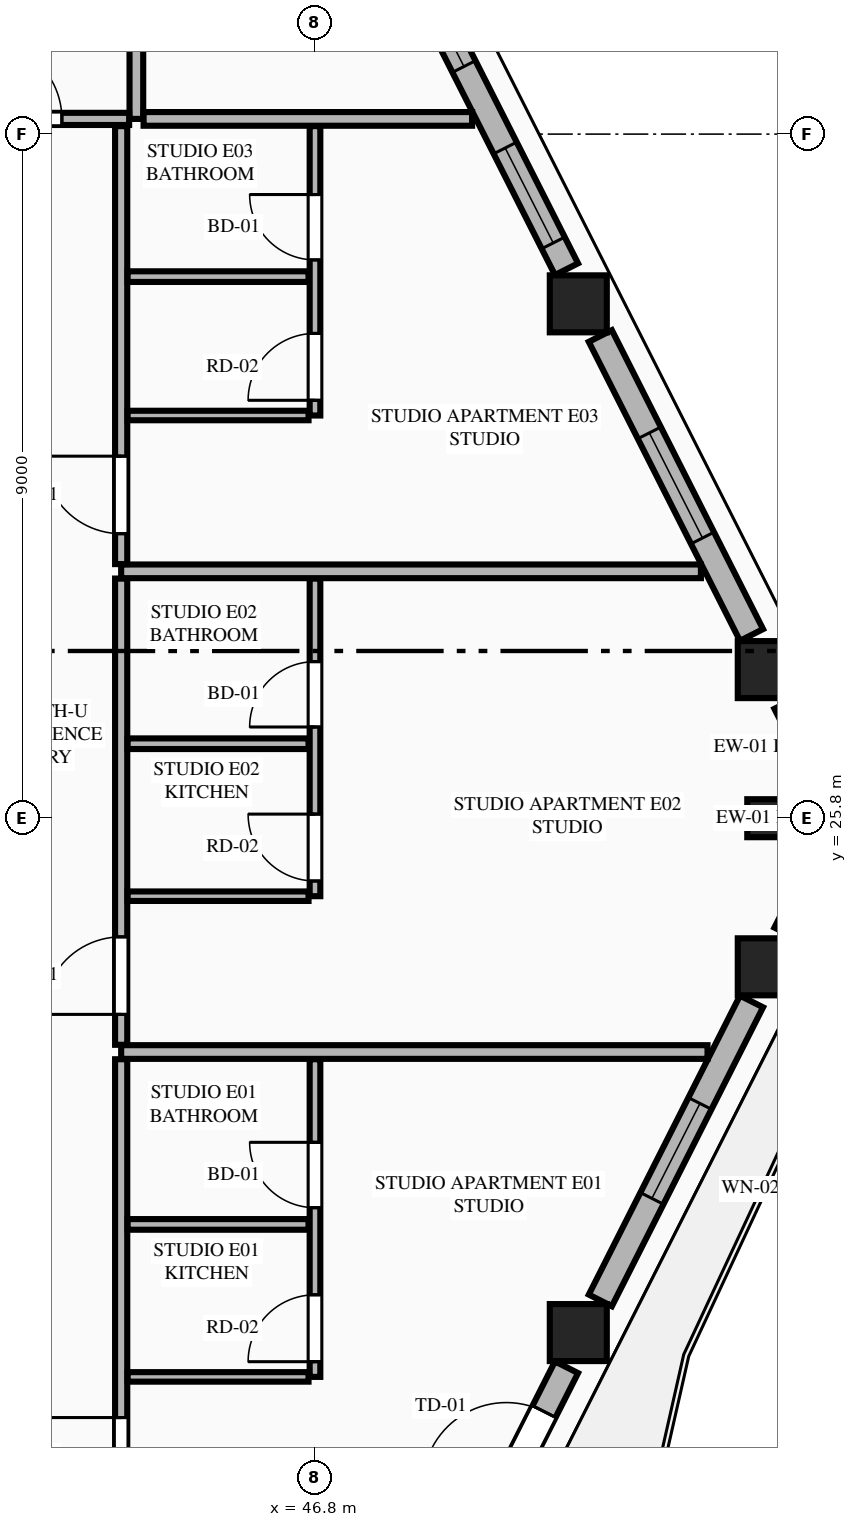
"""IFC4 building model, lengths in metres.
Left out: names, types, materials, properties, quantities, classifications, styles, units other than length and angle.
Written with IfcOpenShell. Run it as: python <this file> out.ifc"""

import sys

from ifc_helpers import new_model, si_unit, direction, frame, frame_2d, origin, origin_2d, place, context, subcontext, project, spatial, rectangle, extrude, element, fill, save


model = new_model("IFC4")
c1 = context("Model", 3, precision=1e-05, world=origin(), true_north=direction((0.0, 1.0)))
c2 = subcontext(c1, "Body", "Model", "MODEL_VIEW")
j1 = project(units=[si_unit("LENGTHUNIT", "METRE"), si_unit("PLANEANGLEUNIT", "RADIAN")], contexts=[c1])
p1 = place(None, origin())
s1 = spatial("IfcSite", under=j1, at=p1, CompositionType="ELEMENT")
p2 = place(p1, origin())
s2 = spatial("IfcBuilding", under=s1, at=p2, CompositionType="ELEMENT")
p3 = place(p2, frame((0.0, 0.0, 248.9)))
s3 = spatial("IfcBuildingStorey", under=s2, at=p3, CompositionType="ELEMENT", Elevation=248.9)
for number, where, z_axis, x_axis in (
    (1, (50.264, 19.033, 0.0), (0.0, 0.0, 1.0), (1.0, 0.0, 0.0)),
    (2, (52.737, 23.845, 0.0), (0.0, 0.0, 1.0), (1.0, 0.0, 0.0)),
    (3, (52.737, 27.755, 0.0), (0.0, 0.0, 1.0), (1.0, 0.0, 0.0)),
    (4, (50.264, 32.567, 0.0), (0.0, 0.0, 1.0), (1.0, 0.0, 0.0)),
):
    element("IfcColumn", number, at=place(p3, frame(where, z_axis=z_axis, x_axis=x_axis)), inside=s3, PredefinedType="COLUMN", context=c2, shape_type="SweptSolid", body=[
        extrude(rectangle(XDim=0.75, YDim=0.75, at=origin_2d()), origin(), (0.0, 0.0, 1.0), 3.65),
    ])
p4 = place(p3, frame((52.737, 25.8, 0.0), z_axis=(0.0, 0.0, 1.0), x_axis=(0.0, 1.0, 0.0)))
e5 = element("IfcColumn", 5, at=p4, inside=s3, PredefinedType="PILASTER", context=c2, shape_type="SweptSolid", body=[
    extrude(rectangle(XDim=0.5, YDim=0.35, at=origin_2d()), origin(), (0.0, 0.0, 1.0), 3.65),
])
p5 = place(p3, frame((48.032, 14.473, 0.0), z_axis=(0.0, 0.0, 1.0), x_axis=(0.451539564999, 0.892251097641, 0.0)))
e6 = element("IfcWall", 6, at=p5, inside=s3, PredefinedType="STANDARD", context=c2, shape_type="SweptSolid", body=[
    extrude(rectangle(XDim=4.6, YDim=0.34, at=frame_2d((2.3, 0.0))), origin(), (0.0, 0.0, 1.0), 2.983),
])
p6 = place(p5, frame((2.846, 0.0, 0.0)))
e7 = element("IfcOpeningElement", 7, at=p6, cuts=e6, PredefinedType="OPENING", context=c2, shape_type="SweptSolid", body=[
    extrude(rectangle(XDim=1.1, YDim=2.25, at=frame_2d((0.55, 1.125))), frame((0.0, 0.18, 0.0), z_axis=(0.0, -1.0, 0.0), x_axis=(1.0, 0.0, 0.0)), (0.0, 0.0, 1.0), 0.36),
])
p7 = place(p5, frame((0.4, 0.0, 0.75)))
e8 = element("IfcOpeningElement", 8, at=p7, cuts=e6, PredefinedType="OPENING", context=c2, shape_type="SweptSolid", body=[
    extrude(rectangle(XDim=1.1, YDim=2.0, at=frame_2d((0.55, 1.0))), frame((0.0, 0.18, 0.0), z_axis=(0.0, -1.0, 0.0), x_axis=(1.0, 0.0, 0.0)), (0.0, 0.0, 1.0), 0.36),
])
p8 = place(p3, frame((50.554, 19.456, 0.0), z_axis=(0.0, 0.0, 1.0), x_axis=(0.45130817501, 0.892368158984, 0.0)))
e9 = element("IfcWall", 9, at=p8, inside=s3, PredefinedType="STANDARD", context=c2, shape_type="SweptSolid", body=[
    extrude(rectangle(XDim=4.407, YDim=0.34, at=frame_2d((2.204, 0.0))), origin(), (0.0, 0.0, 1.0), 2.983),
])
p9 = place(p8, frame((1.504, 0.0, 0.75)))
e10 = element("IfcOpeningElement", 10, at=p9, cuts=e9, PredefinedType="OPENING", context=c2, shape_type="SweptSolid", body=[
    extrude(rectangle(XDim=1.4, YDim=2.05, at=frame_2d((0.7, 1.025))), frame((0.0, 0.18, 0.0), z_axis=(0.0, -1.0, 0.0), x_axis=(1.0, 0.0, 0.0)), (0.0, 0.0, 1.0), 0.36),
])
for number, where, z_axis, x_axis in (
    (11, (52.996, 24.284, 0.0), (0.0, 0.0, 1.0), (0.451, 0.893, 0.0)),
    (12, (53.344, 26.627, 0.0), (0.0, 0.0, 1.0), (-0.451, 0.893, 0.0)),
):
    element("IfcWall", number, at=place(p3, frame(where, z_axis=z_axis, x_axis=x_axis)), inside=s3, PredefinedType="STANDARD", context=c2, shape_type="SweptSolid", body=[
        extrude(rectangle(XDim=0.772, YDim=0.34, at=frame_2d((0.386, 0.0))), origin(), (0.0, 0.0, 1.0), 3.45),
    ])
p10 = place(p3, frame((52.543, 28.211, 0.0), z_axis=(0.0, 0.0, 1.0), x_axis=(-0.451285866323, 0.892379441077, 0.0)))
e13 = element("IfcWall", 13, at=p10, inside=s3, PredefinedType="STANDARD", context=c2, shape_type="SweptSolid", body=[
    extrude(rectangle(XDim=4.407, YDim=0.34, at=frame_2d((2.204, 0.0))), origin(), (0.0, 0.0, 1.0), 2.983),
])
p11 = place(p10, frame((1.429, 0.0, 0.75)))
e14 = element("IfcOpeningElement", 14, at=p11, cuts=e13, PredefinedType="OPENING", context=c2, shape_type="SweptSolid", body=[
    extrude(rectangle(XDim=1.55, YDim=2.05, at=frame_2d((0.775, 1.025))), frame((0.0, 0.18, 0.0), z_axis=(0.0, -1.0, 0.0), x_axis=(1.0, 0.0, 0.0)), (0.0, 0.0, 1.0), 0.36),
])
p12 = place(p3, frame((50.109, 33.023, 0.0), z_axis=(0.0, 0.0, 1.0), x_axis=(-0.451539564999, 0.892251097641, 0.0)))
e15 = element("IfcWall", 15, at=p12, inside=s3, PredefinedType="STANDARD", context=c2, shape_type="SweptSolid", body=[
    extrude(rectangle(XDim=4.6, YDim=0.34, at=frame_2d((2.3, 0.0))), origin(), (0.0, 0.0, 1.0), 2.983),
])
p13 = place(p12, frame((0.387, 0.0, 0.75)))
e16 = element("IfcOpeningElement", 16, at=p13, cuts=e15, PredefinedType="OPENING", context=c2, shape_type="SweptSolid", body=[
    extrude(rectangle(XDim=1.4, YDim=2.05, at=frame_2d((0.7, 1.025))), frame((0.0, 0.18, 0.0), z_axis=(0.0, -1.0, 0.0), x_axis=(1.0, 0.0, 0.0)), (0.0, 0.0, 1.0), 0.36),
])
p14 = place(p12, frame((2.988, 0.0, 0.75)))
e17 = element("IfcOpeningElement", 17, at=p14, cuts=e15, PredefinedType="OPENING", context=c2, shape_type="SweptSolid", body=[
    extrude(rectangle(XDim=1.1, YDim=2.0, at=frame_2d((0.55, 1.0))), frame((0.0, 0.18, 0.0), z_axis=(0.0, -1.0, 0.0), x_axis=(1.0, 0.0, 0.0)), (0.0, 0.0, 1.0), 0.36),
])
p15 = place(p3, frame((44.45, 35.0, 0.0), z_axis=(0.0, 0.0, 1.0), x_axis=(0.0, 1.0, 0.0)))
e18 = element("IfcWall", 18, at=p15, inside=s3, PredefinedType="PARTITIONING", context=c2, shape_type="SweptSolid", body=[
    extrude(rectangle(XDim=8.481, YDim=0.18, at=frame_2d((4.24, 0.0))), origin(), (0.0, 0.0, 1.0), 3.45),
])
p16 = place(p3, frame((29.241, 35.0, 0.0), z_axis=(0.0, 0.0, 1.0), x_axis=(1.0, 0.0, 0.0)))
e19 = element("IfcWall", 19, at=p16, inside=s3, PredefinedType="PARTITIONING", context=c2, shape_type="SweptSolid", body=[
    extrude(rectangle(XDim=15.114, YDim=0.16, at=frame_2d((7.557, 0.0))), origin(), (0.0, 0.0, 1.0), 3.45),
])
p17 = place(p16, frame((13.209, 0.0, 0.0)))
e20 = element("IfcOpeningElement", 20, at=p17, cuts=e19, PredefinedType="OPENING", context=c2, shape_type="SweptSolid", body=[
    extrude(rectangle(XDim=1.02, YDim=2.25, at=frame_2d((0.51, 1.125))), frame((0.0, 0.09, 0.0), z_axis=(0.0, -1.0, 0.0), x_axis=(1.0, 0.0, 0.0)), (0.0, 0.0, 1.0), 0.18),
])
p18 = place(p3, frame((44.545, 35.0, 0.0), z_axis=(0.0, 0.0, 1.0), x_axis=(1.0, 0.0, 0.0)))
e21 = element("IfcWall", 21, at=p18, inside=s3, PredefinedType="PARTITIONING", context=c2, shape_type="SweptSolid", body=[
    extrude(rectangle(XDim=4.322, YDim=0.18, at=frame_2d((2.161, 0.0))), origin(), (0.0, 0.0, 1.0), 3.45),
])
p19 = place(p3, frame((44.25, 16.495, 0.0), z_axis=(0.0, 0.0, 1.0), x_axis=(0.0, 1.0, 0.0)))
e22 = element("IfcWall", 22, at=p19, inside=s3, PredefinedType="PARTITIONING", context=c2, shape_type="SweptSolid", body=[
    extrude(rectangle(XDim=6.134, YDim=0.16, at=frame_2d((3.067, 0.0))), origin(), (0.0, 0.0, 1.0), 3.137),
])
p20 = place(p19, frame((0.4, 0.0, 0.0)))
e23 = element("IfcOpeningElement", 23, at=p20, cuts=e22, PredefinedType="OPENING", context=c2, shape_type="SweptSolid", body=[
    extrude(rectangle(XDim=1.02, YDim=2.25, at=frame_2d((0.51, 1.125))), frame((0.0, 0.09, 0.0), z_axis=(0.0, -1.0, 0.0), x_axis=(1.0, 0.0, 0.0)), (0.0, 0.0, 1.0), 0.18),
])
p21 = place(p3, frame((44.335, 18.45, 0.0), z_axis=(0.0, 0.0, 1.0), x_axis=(1.0, 0.0, 0.0)))
e24 = element("IfcWall", 24, at=p21, inside=s3, PredefinedType="PARTITIONING", context=c2, shape_type="SweptSolid", body=[
    extrude(rectangle(XDim=2.38, YDim=0.125, at=frame_2d((1.19, 0.0))), origin(), (0.0, 0.0, 1.0), 3.45),
])
p22 = place(p3, frame((46.8, 18.45, 0.0), z_axis=(0.0, 0.0, 1.0), x_axis=(0.0, 1.0, 0.0)))
e25 = element("IfcWall", 25, at=p22, inside=s3, PredefinedType="PLUMBINGWALL", context=c2, shape_type="SweptSolid", body=[
    extrude(rectangle(XDim=4.179, YDim=0.14, at=frame_2d((2.089, 0.0))), origin(), (0.0, 0.0, 1.0), 3.45),
])
p23 = place(p22, frame((2.226, 0.0, 0.0)))
e26 = element("IfcOpeningElement", 26, at=p23, cuts=e25, PredefinedType="OPENING", context=c2, shape_type="SweptSolid", body=[
    extrude(rectangle(XDim=0.86, YDim=2.1, at=frame_2d((0.43, 1.05))), frame((0.0, 0.08, 0.0), z_axis=(0.0, -1.0, 0.0), x_axis=(1.0, 0.0, 0.0)), (0.0, 0.0, 1.0), 0.16),
])
p24 = place(p22, frame((0.2, 0.0, 0.0)))
e27 = element("IfcOpeningElement", 27, at=p24, cuts=e25, PredefinedType="OPENING", context=c2, shape_type="SweptSolid", body=[
    extrude(rectangle(XDim=0.88, YDim=2.15, at=frame_2d((0.44, 1.075))), frame((0.0, 0.08, 0.0), z_axis=(0.0, -1.0, 0.0), x_axis=(1.0, 0.0, 0.0)), (0.0, 0.0, 1.0), 0.16),
])
p25 = place(p3, frame((44.335, 20.456, 0.0), z_axis=(0.0, 0.0, 1.0), x_axis=(1.0, 0.0, 0.0)))
e28 = element("IfcWall", 28, at=p25, inside=s3, PredefinedType="PLUMBINGWALL", context=c2, shape_type="SweptSolid", body=[
    extrude(rectangle(XDim=2.38, YDim=0.14, at=frame_2d((1.19, 0.0))), origin(), (0.0, 0.0, 1.0), 3.45),
])
p26 = place(p3, frame((44.25, 22.724, 0.0), z_axis=(0.0, 0.0, 1.0), x_axis=(1.0, 0.0, 0.0)))
e29 = element("IfcWall", 29, at=p26, inside=s3, PredefinedType="PARTITIONING", context=c2, shape_type="SweptSolid", body=[
    extrude(rectangle(XDim=7.714, YDim=0.18, at=frame_2d((3.857, 0.0))), origin(), (0.0, 0.0, 1.0), 3.45),
])
p27 = place(p3, frame((44.25, 22.819, 0.0), z_axis=(0.0, 0.0, 1.0), x_axis=(0.0, 1.0, 0.0)))
e30 = element("IfcWall", 30, at=p27, inside=s3, PredefinedType="PARTITIONING", context=c2, shape_type="SweptSolid", body=[
    extrude(rectangle(XDim=6.134, YDim=0.16, at=frame_2d((3.067, 0.0))), origin(), (0.0, 0.0, 1.0), 3.137),
])
p28 = place(p27, frame((0.4, 0.0, 0.0)))
e31 = element("IfcOpeningElement", 31, at=p28, cuts=e30, PredefinedType="OPENING", context=c2, shape_type="SweptSolid", body=[
    extrude(rectangle(XDim=1.02, YDim=2.25, at=frame_2d((0.51, 1.125))), frame((0.0, 0.09, 0.0), z_axis=(0.0, -1.0, 0.0), x_axis=(1.0, 0.0, 0.0)), (0.0, 0.0, 1.0), 0.18),
])
p29 = place(p3, frame((44.335, 24.774, 0.0), z_axis=(0.0, 0.0, 1.0), x_axis=(1.0, 0.0, 0.0)))
e32 = element("IfcWall", 32, at=p29, inside=s3, PredefinedType="PARTITIONING", context=c2, shape_type="SweptSolid", body=[
    extrude(rectangle(XDim=2.38, YDim=0.125, at=frame_2d((1.19, 0.0))), origin(), (0.0, 0.0, 1.0), 3.45),
])
p30 = place(p3, frame((46.8, 24.774, 0.0), z_axis=(0.0, 0.0, 1.0), x_axis=(0.0, 1.0, 0.0)))
e33 = element("IfcWall", 33, at=p30, inside=s3, PredefinedType="PLUMBINGWALL", context=c2, shape_type="SweptSolid", body=[
    extrude(rectangle(XDim=4.179, YDim=0.14, at=frame_2d((2.089, 0.0))), origin(), (0.0, 0.0, 1.0), 3.45),
])
p31 = place(p30, frame((2.226, 0.0, 0.0)))
e34 = element("IfcOpeningElement", 34, at=p31, cuts=e33, PredefinedType="OPENING", context=c2, shape_type="SweptSolid", body=[
    extrude(rectangle(XDim=0.86, YDim=2.1, at=frame_2d((0.43, 1.05))), frame((0.0, 0.08, 0.0), z_axis=(0.0, -1.0, 0.0), x_axis=(1.0, 0.0, 0.0)), (0.0, 0.0, 1.0), 0.16),
])
p32 = place(p30, frame((0.2, 0.0, 0.0)))
e35 = element("IfcOpeningElement", 35, at=p32, cuts=e33, PredefinedType="OPENING", context=c2, shape_type="SweptSolid", body=[
    extrude(rectangle(XDim=0.88, YDim=2.15, at=frame_2d((0.44, 1.075))), frame((0.0, 0.08, 0.0), z_axis=(0.0, -1.0, 0.0), x_axis=(1.0, 0.0, 0.0)), (0.0, 0.0, 1.0), 0.16),
])
p33 = place(p3, frame((44.335, 26.78, 0.0), z_axis=(0.0, 0.0, 1.0), x_axis=(1.0, 0.0, 0.0)))
e36 = element("IfcWall", 36, at=p33, inside=s3, PredefinedType="PLUMBINGWALL", context=c2, shape_type="SweptSolid", body=[
    extrude(rectangle(XDim=2.38, YDim=0.14, at=frame_2d((1.19, 0.0))), origin(), (0.0, 0.0, 1.0), 3.45),
])
p34 = place(p3, frame((44.25, 29.048, 0.0), z_axis=(0.0, 0.0, 1.0), x_axis=(1.0, 0.0, 0.0)))
e37 = element("IfcWall", 37, at=p34, inside=s3, PredefinedType="PARTITIONING", context=c2, shape_type="SweptSolid", body=[
    extrude(rectangle(XDim=7.627, YDim=0.18, at=frame_2d((3.813, 0.0))), origin(), (0.0, 0.0, 1.0), 3.45),
])
p35 = place(p3, frame((44.25, 29.143, 0.0), z_axis=(0.0, 0.0, 1.0), x_axis=(0.0, 1.0, 0.0)))
e38 = element("IfcWall", 38, at=p35, inside=s3, PredefinedType="PARTITIONING", context=c2, shape_type="SweptSolid", body=[
    extrude(rectangle(XDim=5.762, YDim=0.16, at=frame_2d((2.881, 0.0))), origin(), (0.0, 0.0, 1.0), 3.137),
])
p36 = place(p35, frame((0.4, 0.0, 0.0)))
e39 = element("IfcOpeningElement", 39, at=p36, cuts=e38, PredefinedType="OPENING", context=c2, shape_type="SweptSolid", body=[
    extrude(rectangle(XDim=1.02, YDim=2.25, at=frame_2d((0.51, 1.125))), frame((0.0, 0.09, 0.0), z_axis=(0.0, -1.0, 0.0), x_axis=(1.0, 0.0, 0.0)), (0.0, 0.0, 1.0), 0.18),
])
p37 = place(p3, frame((44.335, 31.098, 0.0), z_axis=(0.0, 0.0, 1.0), x_axis=(1.0, 0.0, 0.0)))
e40 = element("IfcWall", 40, at=p37, inside=s3, PredefinedType="PARTITIONING", context=c2, shape_type="SweptSolid", body=[
    extrude(rectangle(XDim=2.38, YDim=0.125, at=frame_2d((1.19, 0.0))), origin(), (0.0, 0.0, 1.0), 3.45),
])
p38 = place(p3, frame((46.8, 31.098, 0.0), z_axis=(0.0, 0.0, 1.0), x_axis=(0.0, 1.0, 0.0)))
e41 = element("IfcWall", 41, at=p38, inside=s3, PredefinedType="PLUMBINGWALL", context=c2, shape_type="SweptSolid", body=[
    extrude(rectangle(XDim=3.807, YDim=0.14, at=frame_2d((1.904, 0.0))), origin(), (0.0, 0.0, 1.0), 3.45),
])
p39 = place(p38, frame((2.047, 0.0, 0.0)))
e42 = element("IfcOpeningElement", 42, at=p39, cuts=e41, PredefinedType="OPENING", context=c2, shape_type="SweptSolid", body=[
    extrude(rectangle(XDim=0.86, YDim=2.1, at=frame_2d((0.43, 1.05))), frame((0.0, 0.08, 0.0), z_axis=(0.0, -1.0, 0.0), x_axis=(1.0, 0.0, 0.0)), (0.0, 0.0, 1.0), 0.16),
])
p40 = place(p38, frame((0.2, 0.0, 0.0)))
e43 = element("IfcOpeningElement", 43, at=p40, cuts=e41, PredefinedType="OPENING", context=c2, shape_type="SweptSolid", body=[
    extrude(rectangle(XDim=0.88, YDim=2.15, at=frame_2d((0.44, 1.075))), frame((0.0, 0.08, 0.0), z_axis=(0.0, -1.0, 0.0), x_axis=(1.0, 0.0, 0.0)), (0.0, 0.0, 1.0), 0.16),
])
p41 = place(p3, frame((44.335, 32.925, 0.0), z_axis=(0.0, 0.0, 1.0), x_axis=(1.0, 0.0, 0.0)))
e44 = element("IfcWall", 44, at=p41, inside=s3, PredefinedType="PLUMBINGWALL", context=c2, shape_type="SweptSolid", body=[
    extrude(rectangle(XDim=2.38, YDim=0.14, at=frame_2d((1.19, 0.0))), origin(), (0.0, 0.0, 1.0), 3.45),
])
p42 = place(p6, origin())
e45 = element("IfcDoor", 45, at=p42, inside=s3, OperationType="SINGLE_SWING_LEFT", PredefinedType="DOOR", context=c2, shape_type="SweptSolid", body=[
    extrude(rectangle(XDim=1.1, YDim=2.25, at=frame_2d((0.55, 1.125))), frame((0.0, 0.025, 0.0), z_axis=(0.0, -1.0, 0.0), x_axis=(1.0, 0.0, 0.0)), (0.0, 0.0, 1.0), 0.05),
])
fill(e7, e45)
p43 = place(p9, origin())
e46 = element("IfcWindow", 46, at=p43, inside=s3, PartitioningType="SINGLE_PANEL", PredefinedType="WINDOW", context=c2, shape_type="SweptSolid", body=[
    extrude(rectangle(XDim=1.4, YDim=2.05, at=frame_2d((0.7, 1.025))), frame((0.0, 0.03, 0.0), z_axis=(0.0, -1.0, 0.0), x_axis=(1.0, 0.0, 0.0)), (0.0, 0.0, 1.0), 0.06),
])
fill(e10, e46)
p44 = place(p11, origin())
e47 = element("IfcWindow", 47, at=p44, inside=s3, PartitioningType="SINGLE_PANEL", PredefinedType="WINDOW", context=c2, shape_type="SweptSolid", body=[
    extrude(rectangle(XDim=1.55, YDim=2.05, at=frame_2d((0.775, 1.025))), frame((0.0, 0.03, 0.0), z_axis=(0.0, -1.0, 0.0), x_axis=(1.0, 0.0, 0.0)), (0.0, 0.0, 1.0), 0.06),
])
fill(e14, e47)
p45 = place(p13, origin())
e48 = element("IfcWindow", 48, at=p45, inside=s3, PartitioningType="SINGLE_PANEL", PredefinedType="WINDOW", context=c2, shape_type="SweptSolid", body=[
    extrude(rectangle(XDim=1.4, YDim=2.05, at=frame_2d((0.7, 1.025))), frame((0.0, 0.03, 0.0), z_axis=(0.0, -1.0, 0.0), x_axis=(1.0, 0.0, 0.0)), (0.0, 0.0, 1.0), 0.06),
])
fill(e16, e48)
p46 = place(p17, origin())
e49 = element("IfcDoor", 49, at=p46, inside=s3, OperationType="SINGLE_SWING_LEFT", PredefinedType="DOOR", context=c2, shape_type="SweptSolid", body=[
    extrude(rectangle(XDim=1.02, YDim=2.25, at=frame_2d((0.51, 1.125))), frame((0.0, 0.025, 0.0), z_axis=(0.0, -1.0, 0.0), x_axis=(1.0, 0.0, 0.0)), (0.0, 0.0, 1.0), 0.05),
])
fill(e20, e49)
p47 = place(p23, origin())
e50 = element("IfcDoor", 50, at=p47, inside=s3, OperationType="SINGLE_SWING_RIGHT", PredefinedType="DOOR", context=c2, shape_type="SweptSolid", body=[
    extrude(rectangle(XDim=0.86, YDim=2.1, at=frame_2d((0.43, 1.05))), frame((0.0, 0.025, 0.0), z_axis=(0.0, -1.0, 0.0), x_axis=(1.0, 0.0, 0.0)), (0.0, 0.0, 1.0), 0.05),
])
fill(e26, e50)
p48 = place(p20, origin())
e51 = element("IfcDoor", 51, at=p48, inside=s3, OperationType="SINGLE_SWING_RIGHT", PredefinedType="DOOR", context=c2, shape_type="SweptSolid", body=[
    extrude(rectangle(XDim=1.02, YDim=2.25, at=frame_2d((0.51, 1.125))), frame((0.0, 0.025, 0.0), z_axis=(0.0, -1.0, 0.0), x_axis=(1.0, 0.0, 0.0)), (0.0, 0.0, 1.0), 0.05),
])
fill(e23, e51)
p49 = place(p24, origin())
e52 = element("IfcDoor", 52, at=p49, inside=s3, OperationType="SINGLE_SWING_LEFT", PredefinedType="DOOR", context=c2, shape_type="SweptSolid", body=[
    extrude(rectangle(XDim=0.88, YDim=2.15, at=frame_2d((0.44, 1.075))), frame((0.0, 0.025, 0.0), z_axis=(0.0, -1.0, 0.0), x_axis=(1.0, 0.0, 0.0)), (0.0, 0.0, 1.0), 0.05),
])
fill(e27, e52)
p50 = place(p31, origin())
e53 = element("IfcDoor", 53, at=p50, inside=s3, OperationType="SINGLE_SWING_LEFT", PredefinedType="DOOR", context=c2, shape_type="SweptSolid", body=[
    extrude(rectangle(XDim=0.86, YDim=2.1, at=frame_2d((0.43, 1.05))), frame((0.0, 0.025, 0.0), z_axis=(0.0, -1.0, 0.0), x_axis=(1.0, 0.0, 0.0)), (0.0, 0.0, 1.0), 0.05),
])
fill(e34, e53)
p51 = place(p28, origin())
e54 = element("IfcDoor", 54, at=p51, inside=s3, OperationType="SINGLE_SWING_LEFT", PredefinedType="DOOR", context=c2, shape_type="SweptSolid", body=[
    extrude(rectangle(XDim=1.02, YDim=2.25, at=frame_2d((0.51, 1.125))), frame((0.0, 0.025, 0.0), z_axis=(0.0, -1.0, 0.0), x_axis=(1.0, 0.0, 0.0)), (0.0, 0.0, 1.0), 0.05),
])
fill(e31, e54)
p52 = place(p32, origin())
e55 = element("IfcDoor", 55, at=p52, inside=s3, OperationType="SINGLE_SWING_RIGHT", PredefinedType="DOOR", context=c2, shape_type="SweptSolid", body=[
    extrude(rectangle(XDim=0.88, YDim=2.15, at=frame_2d((0.44, 1.075))), frame((0.0, 0.025, 0.0), z_axis=(0.0, -1.0, 0.0), x_axis=(1.0, 0.0, 0.0)), (0.0, 0.0, 1.0), 0.05),
])
fill(e35, e55)
p53 = place(p39, origin())
e56 = element("IfcDoor", 56, at=p53, inside=s3, OperationType="SINGLE_SWING_RIGHT", PredefinedType="DOOR", context=c2, shape_type="SweptSolid", body=[
    extrude(rectangle(XDim=0.86, YDim=2.1, at=frame_2d((0.43, 1.05))), frame((0.0, 0.025, 0.0), z_axis=(0.0, -1.0, 0.0), x_axis=(1.0, 0.0, 0.0)), (0.0, 0.0, 1.0), 0.05),
])
fill(e42, e56)
p54 = place(p36, origin())
e57 = element("IfcDoor", 57, at=p54, inside=s3, OperationType="SINGLE_SWING_RIGHT", PredefinedType="DOOR", context=c2, shape_type="SweptSolid", body=[
    extrude(rectangle(XDim=1.02, YDim=2.25, at=frame_2d((0.51, 1.125))), frame((0.0, 0.025, 0.0), z_axis=(0.0, -1.0, 0.0), x_axis=(1.0, 0.0, 0.0)), (0.0, 0.0, 1.0), 0.05),
])
fill(e39, e57)
p55 = place(p40, origin())
e58 = element("IfcDoor", 58, at=p55, inside=s3, OperationType="SINGLE_SWING_LEFT", PredefinedType="DOOR", context=c2, shape_type="SweptSolid", body=[
    extrude(rectangle(XDim=0.88, YDim=2.15, at=frame_2d((0.44, 1.075))), frame((0.0, 0.025, 0.0), z_axis=(0.0, -1.0, 0.0), x_axis=(1.0, 0.0, 0.0)), (0.0, 0.0, 1.0), 0.05),
])
fill(e43, e58)
p56 = place(p14, origin())
e59 = element("IfcWindow", 59, at=p56, inside=s3, PartitioningType="SINGLE_PANEL", PredefinedType="WINDOW", context=c2, shape_type="SweptSolid", body=[
    extrude(rectangle(XDim=1.1, YDim=2.0, at=frame_2d((0.55, 1.0))), frame((0.0, 0.03, 0.0), z_axis=(0.0, -1.0, 0.0), x_axis=(1.0, 0.0, 0.0)), (0.0, 0.0, 1.0), 0.06),
])
fill(e17, e59)
save(model, sys.argv[1])
